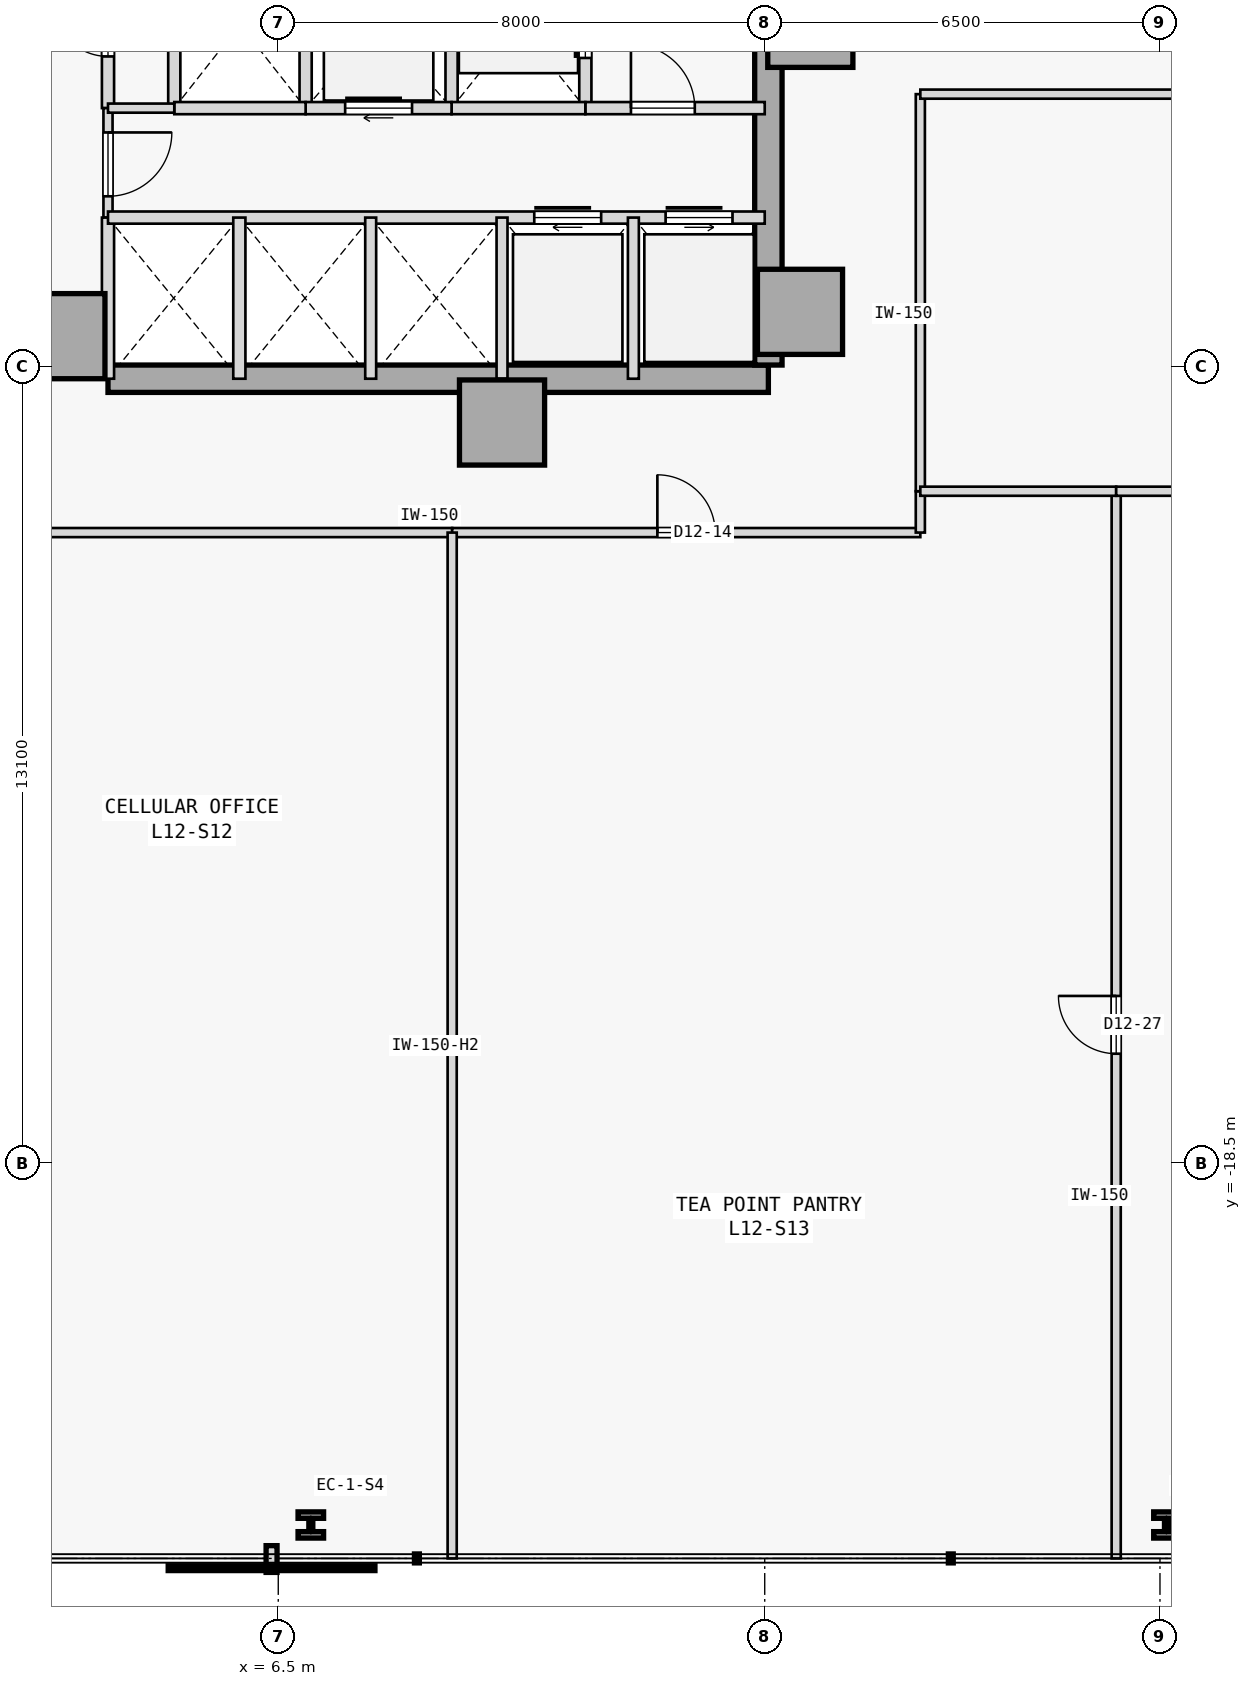
"""IFC4 building model, lengths in metres.
Left out: names, types, materials, properties, quantities, classifications, styles, units other than length and angle.
Written with IfcOpenShell. Run it as: python <this file> out.ifc"""

import sys

from ifc_helpers import new_model, si_unit, direction, frame, frame_2d, origin, origin_2d, place, context, subcontext, project, spatial, rectangle, i_section, extrude, element, fill, save


model = new_model("IFC4")
c1 = context("Model", 3, precision=1e-05, world=origin(), true_north=direction((0.0, 1.0)))
c2 = subcontext(c1, "Body", "Model", "MODEL_VIEW")
j1 = project(units=[si_unit("LENGTHUNIT", "METRE"), si_unit("PLANEANGLEUNIT", "RADIAN")], contexts=[c1])
p1 = place(None, origin())
s1 = spatial("IfcSite", under=j1, at=p1, CompositionType="ELEMENT")
p2 = place(p1, origin())
s2 = spatial("IfcBuilding", under=s1, at=p2, CompositionType="ELEMENT")
p3 = place(p2, frame((0.0, 0.0, 52.2)))
s3 = spatial("IfcBuildingStorey", under=s2, at=p3, CompositionType="ELEMENT", Elevation=52.2)
for number, where, z_axis, x_axis in (
    (1, (15.25, 0.22, 0.0), (0.0, 0.0, 1.0), (1.0, 0.0, 0.0)),
    (2, (15.08, -4.5, 0.0), (0.0, 0.0, 1.0), (1.0, 0.0, 0.0)),
    (3, (10.18, -6.32, 0.0), (0.0, 0.0, 1.0), (1.0, 0.0, 0.0)),
    (4, (2.95, -4.9, 0.0), (0.0, 0.0, 1.0), (1.0, 0.0, 0.0)),
):
    element("IfcColumn", number, at=place(p3, frame(where, z_axis=z_axis, x_axis=x_axis)), inside=s3, PredefinedType="COLUMN", context=c2, shape_type="SweptSolid", body=[
        extrude(rectangle(XDim=1.4, YDim=1.4, at=origin_2d()), origin(), (0.0, 0.0, 1.0), 3.8),
    ])
p4 = place(p3, frame((3.7, -5.6, 0.0), z_axis=(0.0, 0.0, 1.0), x_axis=(1.0, 0.0, 0.0)))
e5 = element("IfcWall", 5, at=p4, inside=s3, PredefinedType="SHEAR", context=c2, shape_type="SweptSolid", body=[
    extrude(rectangle(XDim=10.86, YDim=0.45, at=frame_2d((5.43, 0.0))), origin(), (0.0, 0.0, 1.0), 3.575),
])
p5 = place(p3, frame((14.56, -5.375, 0.0), z_axis=(0.0, 0.0, 1.0), x_axis=(0.0, 1.0, 0.0)))
e6 = element("IfcWall", 6, at=p5, inside=s3, PredefinedType="SHEAR", context=c2, shape_type="SweptSolid", body=[
    extrude(rectangle(XDim=10.75, YDim=0.45, at=frame_2d((5.375, 0.0))), origin(), (0.0, 0.0, 1.0), 3.575),
])
for number, where, z_axis, x_axis in (
    (7, (7.036, -24.45, 0.0), (0.0, 0.0, 1.0), (1.0, 0.0, 0.0)),
    (8, (21.107, -24.45, 0.0), (0.0, 0.0, 1.0), (1.0, 0.0, 0.0)),
):
    element("IfcColumn", number, at=place(p3, frame(where, z_axis=z_axis, x_axis=x_axis)), inside=s3, PredefinedType="COLUMN", context=c2, shape_type="SweptSolid", body=[
        extrude(i_section(OverallWidth=0.42, OverallDepth=0.431, WebThickness=0.065, FlangeThickness=0.106, FilletRadius=0.015, at=origin_2d()), origin(), (0.0, 0.0, 1.0), 3.8),
    ])
p6 = place(p3, frame((3.7, -1.15, 0.0), z_axis=(0.0, 0.0, 1.0), x_axis=(0.0, 1.0, 0.0)))
e9 = element("IfcWall", 9, at=p6, inside=s3, PredefinedType="STANDARD", context=c2, shape_type="SweptSolid", body=[
    extrude(rectangle(XDim=6.75, YDim=0.2, at=frame_2d((3.375, 0.0))), origin(), (0.0, 0.0, 1.0), 3.575),
])
p7 = place(p6, frame((3.6, 0.0, 0.0)))
e10 = element("IfcOpeningElement", 10, at=p7, cuts=e9, PredefinedType="OPENING", context=c2, shape_type="SweptSolid", body=[
    extrude(rectangle(XDim=0.92, YDim=2.15, at=frame_2d((0.46, 1.075))), frame((0.0, 0.11, 0.0), z_axis=(0.0, -1.0, 0.0), x_axis=(1.0, 0.0, 0.0)), (0.0, 0.0, 1.0), 0.22),
])
p8 = place(p6, frame((0.85, 0.0, 0.0)))
e11 = element("IfcOpeningElement", 11, at=p8, cuts=e9, PredefinedType="OPENING", context=c2, shape_type="SweptSolid", body=[
    extrude(rectangle(XDim=0.9, YDim=2.15, at=frame_2d((0.45, 1.075))), frame((0.0, 0.11, 0.0), z_axis=(0.0, -1.0, 0.0), x_axis=(1.0, 0.0, 0.0)), (0.0, 0.0, 1.0), 0.22),
])
p9 = place(p3, frame((3.7, -2.95, 0.0), z_axis=(0.0, 0.0, 1.0), x_axis=(0.0, 1.0, 0.0)))
e12 = element("IfcWall", 12, at=p9, inside=s3, PredefinedType="PARTITIONING", context=c2, shape_type="SweptSolid", body=[
    extrude(rectangle(XDim=1.8, YDim=0.15, at=frame_2d((0.9, 0.0))), origin(), (0.0, 0.0, 1.0), 3.575),
])
p10 = place(p9, frame((0.35, 0.0, 0.0)))
e13 = element("IfcOpeningElement", 13, at=p10, cuts=e12, PredefinedType="OPENING", context=c2, shape_type="SweptSolid", body=[
    extrude(rectangle(XDim=1.05, YDim=2.18, at=frame_2d((0.525, 1.09))), frame((0.0, 0.085, 0.0), z_axis=(0.0, -1.0, 0.0), x_axis=(1.0, 0.0, 0.0)), (0.0, 0.0, 1.0), 0.17),
])
p11 = place(p3, frame((3.7, -5.6, 0.0), z_axis=(0.0, 0.0, 1.0), x_axis=(0.0, 1.0, 0.0)))
e14 = element("IfcWall", 14, at=p11, inside=s3, PredefinedType="STANDARD", context=c2, shape_type="SweptSolid", body=[
    extrude(rectangle(XDim=2.65, YDim=0.2, at=frame_2d((1.325, 0.0))), origin(), (0.0, 0.0, 1.0), 3.575),
])
p12 = place(p3, frame((11.55, -1.15, 0.0), z_axis=(0.0, 0.0, 1.0), x_axis=(0.0, 1.0, 0.0)))
e15 = element("IfcWall", 15, at=p12, inside=s3, PredefinedType="STANDARD", context=c2, shape_type="SweptSolid", body=[
    extrude(rectangle(XDim=2.75, YDim=0.2, at=frame_2d((1.375, 0.0))), origin(), (0.0, 0.0, 1.0), 3.575),
])
p13 = place(p12, frame((0.825, 0.0, 0.0)))
e16 = element("IfcOpeningElement", 16, at=p13, cuts=e15, PredefinedType="OPENING", context=c2, shape_type="SweptSolid", body=[
    extrude(rectangle(XDim=1.1, YDim=2.15, at=frame_2d((0.55, 1.075))), frame((0.0, 0.11, 0.0), z_axis=(0.0, -1.0, 0.0), x_axis=(1.0, 0.0, 0.0)), (0.0, 0.0, 1.0), 0.22),
])
p14 = place(p3, frame((9.35, -1.15, 0.0), z_axis=(0.0, 0.0, 1.0), x_axis=(0.0, 1.0, 0.0)))
e17 = element("IfcWall", 17, at=p14, inside=s3, PredefinedType="STANDARD", context=c2, shape_type="SweptSolid", body=[
    extrude(rectangle(XDim=2.75, YDim=0.2, at=frame_2d((1.375, 0.0))), origin(), (0.0, 0.0, 1.0), 3.575),
])
p15 = place(p3, frame((11.55, -1.15, 0.0), z_axis=(0.0, 0.0, 1.0), x_axis=(1.0, 0.0, 0.0)))
e18 = element("IfcWall", 18, at=p15, inside=s3, PredefinedType="STANDARD", context=c2, shape_type="SweptSolid", body=[
    extrude(rectangle(XDim=2.95, YDim=0.2, at=frame_2d((1.475, 0.0))), origin(), (0.0, 0.0, 1.0), 3.575),
])
p16 = place(p15, frame((0.75, 0.0, 0.0)))
e19 = element("IfcOpeningElement", 19, at=p16, cuts=e18, PredefinedType="OPENING", context=c2, shape_type="SweptSolid", body=[
    extrude(rectangle(XDim=1.05, YDim=2.18, at=frame_2d((0.525, 1.09))), frame((0.0, 0.11, 0.0), z_axis=(0.0, -1.0, 0.0), x_axis=(1.0, 0.0, 0.0)), (0.0, 0.0, 1.0), 0.22),
])
p17 = place(p3, frame((9.35, -1.15, 0.0), z_axis=(0.0, 0.0, 1.0), x_axis=(1.0, 0.0, 0.0)))
e20 = element("IfcWall", 20, at=p17, inside=s3, PredefinedType="STANDARD", context=c2, shape_type="SweptSolid", body=[
    extrude(rectangle(XDim=2.2, YDim=0.2, at=frame_2d((1.1, 0.0))), origin(), (0.0, 0.0, 1.0), 3.575),
])
p18 = place(p3, frame((6.95, -1.15, 0.0), z_axis=(0.0, 0.0, 1.0), x_axis=(0.0, 1.0, 0.0)))
e21 = element("IfcWall", 21, at=p18, inside=s3, PredefinedType="STANDARD", context=c2, shape_type="SweptSolid", body=[
    extrude(rectangle(XDim=2.75, YDim=0.2, at=frame_2d((1.375, 0.0))), origin(), (0.0, 0.0, 1.0), 3.575),
])
p19 = place(p3, frame((6.95, -1.15, 0.0), z_axis=(0.0, 0.0, 1.0), x_axis=(1.0, 0.0, 0.0)))
e22 = element("IfcWall", 22, at=p19, inside=s3, PredefinedType="STANDARD", context=c2, shape_type="SweptSolid", body=[
    extrude(rectangle(XDim=2.4, YDim=0.2, at=frame_2d((1.2, 0.0))), origin(), (0.0, 0.0, 1.0), 3.575),
])
p20 = place(p19, frame((0.65, 0.0, 0.0)))
e23 = element("IfcOpeningElement", 23, at=p20, cuts=e22, PredefinedType="OPENING", context=c2, shape_type="SweptSolid", body=[
    extrude(rectangle(XDim=1.1, YDim=2.15, at=frame_2d((0.55, 1.075))), frame((0.0, 0.11, 0.0), z_axis=(0.0, -1.0, 0.0), x_axis=(1.0, 0.0, 0.0)), (0.0, 0.0, 1.0), 0.22),
])
p21 = place(p3, frame((4.79, -1.15, 0.0), z_axis=(0.0, 0.0, 1.0), x_axis=(0.0, 1.0, 0.0)))
e24 = element("IfcWall", 24, at=p21, inside=s3, PredefinedType="STANDARD", context=c2, shape_type="SweptSolid", body=[
    extrude(rectangle(XDim=2.75, YDim=0.2, at=frame_2d((1.375, 0.0))), origin(), (0.0, 0.0, 1.0), 3.575),
])
p22 = place(p3, frame((4.79, -1.15, 0.0), z_axis=(0.0, 0.0, 1.0), x_axis=(1.0, 0.0, 0.0)))
e25 = element("IfcWall", 25, at=p22, inside=s3, PredefinedType="STANDARD", context=c2, shape_type="SweptSolid", body=[
    extrude(rectangle(XDim=2.16, YDim=0.2, at=frame_2d((1.08, 0.0))), origin(), (0.0, 0.0, 1.0), 3.575),
])
p23 = place(p3, frame((3.7, -1.15, 0.0), z_axis=(0.0, 0.0, 1.0), x_axis=(1.0, 0.0, 0.0)))
e26 = element("IfcWall", 26, at=p23, inside=s3, PredefinedType="PARTITIONING", context=c2, shape_type="SweptSolid", body=[
    extrude(rectangle(XDim=1.09, YDim=0.15, at=frame_2d((0.545, 0.0))), origin(), (0.0, 0.0, 1.0), 3.575),
])
p24 = place(p3, frame((3.7, -2.95, 0.0), z_axis=(0.0, 0.0, 1.0), x_axis=(1.0, 0.0, 0.0)))
e27 = element("IfcWall", 27, at=p24, inside=s3, PredefinedType="STANDARD", context=c2, shape_type="SweptSolid", body=[
    extrude(rectangle(XDim=10.8, YDim=0.2, at=frame_2d((5.4, 0.0))), origin(), (0.0, 0.0, 1.0), 3.575),
])
p25 = place(p24, frame((7.01, 0.0, 0.0)))
e28 = element("IfcOpeningElement", 28, at=p25, cuts=e27, PredefinedType="OPENING", context=c2, shape_type="SweptSolid", body=[
    extrude(rectangle(XDim=1.1, YDim=2.15, at=frame_2d((0.55, 1.075))), frame((0.0, 0.11, 0.0), z_axis=(0.0, -1.0, 0.0), x_axis=(1.0, 0.0, 0.0)), (0.0, 0.0, 1.0), 0.22),
])
p26 = place(p24, frame((9.17, 0.0, 0.0)))
e29 = element("IfcOpeningElement", 29, at=p26, cuts=e27, PredefinedType="OPENING", context=c2, shape_type="SweptSolid", body=[
    extrude(rectangle(XDim=1.1, YDim=2.15, at=frame_2d((0.55, 1.075))), frame((0.0, 0.11, 0.0), z_axis=(0.0, -1.0, 0.0), x_axis=(1.0, 0.0, 0.0)), (0.0, 0.0, 1.0), 0.22),
])
p27 = place(p3, frame((5.86, -5.6, 0.0), z_axis=(0.0, 0.0, 1.0), x_axis=(0.0, 1.0, 0.0)))
e30 = element("IfcWall", 30, at=p27, inside=s3, PredefinedType="STANDARD", context=c2, shape_type="SweptSolid", body=[
    extrude(rectangle(XDim=2.65, YDim=0.2, at=frame_2d((1.325, 0.0))), origin(), (0.0, 0.0, 1.0), 3.575),
])
for number, where, z_axis, x_axis in (
    (31, (12.34, -5.6, 0.0), (0.0, 0.0, 1.0), (0.0, 1.0, 0.0)),
    (32, (10.18, -5.6, 0.0), (0.0, 0.0, 1.0), (0.0, 1.0, 0.0)),
    (33, (8.02, -5.6, 0.0), (0.0, 0.0, 1.0), (0.0, 1.0, 0.0)),
):
    element("IfcWall", number, at=place(p3, frame(where, z_axis=z_axis, x_axis=x_axis)), inside=s3, PredefinedType="STANDARD", context=c2, shape_type="SweptSolid", body=[
        extrude(rectangle(XDim=2.65, YDim=0.18, at=frame_2d((1.325, 0.0))), origin(), (0.0, 0.0, 1.0), 3.575),
    ])
p28 = place(p3, frame((0.92, -8.13, 0.0), z_axis=(0.0, 0.0, 1.0), x_axis=(1.0, 0.0, 0.0)))
e34 = element("IfcWall", 34, at=p28, inside=s3, PredefinedType="PARTITIONING", context=c2, shape_type="SweptSolid", body=[
    extrude(rectangle(XDim=8.44, YDim=0.15, at=frame_2d((4.22, 0.0))), origin(), (0.0, 0.0, 1.0), 3.575),
])
p29 = place(p3, frame((9.36, -8.13, 0.0), z_axis=(0.0, 0.0, 1.0), x_axis=(1.0, 0.0, 0.0)))
e35 = element("IfcWall", 35, at=p29, inside=s3, PredefinedType="PARTITIONING", context=c2, shape_type="SweptSolid", body=[
    extrude(rectangle(XDim=7.699, YDim=0.15, at=frame_2d((3.85, 0.0))), origin(), (0.0, 0.0, 1.0), 3.575),
])
p30 = place(p29, frame((3.375, 0.0, 0.0)))
e36 = element("IfcOpeningElement", 36, at=p30, cuts=e35, PredefinedType="OPENING", context=c2, shape_type="SweptSolid", body=[
    extrude(rectangle(XDim=0.95, YDim=2.15, at=frame_2d((0.475, 1.075))), frame((0.0, 0.085, 0.0), z_axis=(0.0, -1.0, 0.0), x_axis=(1.0, 0.0, 0.0)), (0.0, 0.0, 1.0), 0.17),
])
p31 = place(p3, frame((17.059, -8.13, 0.0), z_axis=(0.0, 0.0, 1.0), x_axis=(0.0, 1.0, 0.0)))
e37 = element("IfcWall", 37, at=p31, inside=s3, PredefinedType="PARTITIONING", context=c2, shape_type="SweptSolid", body=[
    extrude(rectangle(XDim=0.68, YDim=0.15, at=frame_2d((0.34, 0.0))), origin(), (0.0, 0.0, 1.0), 3.575),
])
p32 = place(p3, frame((17.059, -7.45, 0.0), z_axis=(0.0, 0.0, 1.0), x_axis=(0.0, 1.0, 0.0)))
e38 = element("IfcWall", 38, at=p32, inside=s3, PredefinedType="PARTITIONING", context=c2, shape_type="SweptSolid", body=[
    extrude(rectangle(XDim=6.53, YDim=0.15, at=frame_2d((3.265, 0.0))), origin(), (0.0, 0.0, 1.0), 3.575),
])
p33 = place(p3, frame((17.059, -0.92, 0.0), z_axis=(0.0, 0.0, 1.0), x_axis=(1.0, 0.0, 0.0)))
e39 = element("IfcWall", 39, at=p33, inside=s3, PredefinedType="PARTITIONING", context=c2, shape_type="SweptSolid", body=[
    extrude(rectangle(XDim=21.941, YDim=0.15, at=frame_2d((10.97, 0.0))), origin(), (0.0, 0.0, 1.0), 3.575),
])
p34 = place(p33, frame((10.496, 0.0, 0.0)))
e40 = element("IfcOpeningElement", 40, at=p34, cuts=e39, PredefinedType="OPENING", context=c2, shape_type="SweptSolid", body=[
    extrude(rectangle(XDim=0.95, YDim=2.15, at=frame_2d((0.475, 1.075))), frame((0.0, 0.085, 0.0), z_axis=(0.0, -1.0, 0.0), x_axis=(1.0, 0.0, 0.0)), (0.0, 0.0, 1.0), 0.17),
])
p35 = place(p3, frame((9.36, -25.0, 0.0), z_axis=(0.0, 0.0, 1.0), x_axis=(0.0, 1.0, 0.0)))
e41 = element("IfcWall", 41, at=p35, inside=s3, PredefinedType="PARTITIONING", context=c2, shape_type="SweptSolid", body=[
    extrude(rectangle(XDim=16.87, YDim=0.15, at=frame_2d((8.435, 0.0))), origin(), (0.0, 0.0, 1.0), 2.975),
])
p36 = place(p3, frame((20.28, -25.0, 0.0), z_axis=(0.0, 0.0, 1.0), x_axis=(0.0, 1.0, 0.0)))
e42 = element("IfcWall", 42, at=p36, inside=s3, PredefinedType="PARTITIONING", context=c2, shape_type="SweptSolid", body=[
    extrude(rectangle(XDim=17.55, YDim=0.15, at=frame_2d((8.775, 0.0))), origin(), (0.0, 0.0, 1.0), 3.575),
])
p37 = place(p36, frame((8.3, 0.0, 0.0)))
e43 = element("IfcOpeningElement", 43, at=p37, cuts=e42, PredefinedType="OPENING", context=c2, shape_type="SweptSolid", body=[
    extrude(rectangle(XDim=0.95, YDim=2.15, at=frame_2d((0.475, 1.075))), frame((0.0, 0.085, 0.0), z_axis=(0.0, -1.0, 0.0), x_axis=(1.0, 0.0, 0.0)), (0.0, 0.0, 1.0), 0.17),
])
p38 = place(p3, frame((17.059, -7.45, 0.0), z_axis=(0.0, 0.0, 1.0), x_axis=(1.0, 0.0, 0.0)))
e44 = element("IfcWall", 44, at=p38, inside=s3, PredefinedType="PARTITIONING", context=c2, shape_type="SweptSolid", body=[
    extrude(rectangle(XDim=3.221, YDim=0.15, at=frame_2d((1.61, 0.0))), origin(), (0.0, 0.0, 1.0), 3.575),
])
p39 = place(p3, frame((20.28, -7.45, 0.0), z_axis=(0.0, 0.0, 1.0), x_axis=(1.0, 0.0, 0.0)))
e45 = element("IfcWall", 45, at=p39, inside=s3, PredefinedType="PARTITIONING", context=c2, shape_type="SweptSolid", body=[
    extrude(rectangle(XDim=10.14, YDim=0.15, at=frame_2d((5.07, 0.0))), origin(), (0.0, 0.0, 1.0), 3.575),
])
p40 = place(p16, origin())
e46 = element("IfcDoor", 46, at=p40, inside=s3, OperationType="SINGLE_SWING_LEFT", PredefinedType="DOOR", context=c2, shape_type="SweptSolid", body=[
    extrude(rectangle(XDim=1.05, YDim=2.18, at=frame_2d((0.525, 1.09))), frame((0.0, 0.025, 0.0), z_axis=(0.0, -1.0, 0.0), x_axis=(1.0, 0.0, 0.0)), (0.0, 0.0, 1.0), 0.05),
])
fill(e19, e46)
p41 = place(p10, frame((1.05, 0.0, 0.0), z_axis=(0.0, 0.0, 1.0), x_axis=(-1.0, 0.0, 0.0)))
e47 = element("IfcDoor", 47, at=p41, inside=s3, OperationType="SINGLE_SWING_RIGHT", PredefinedType="DOOR", context=c2, shape_type="SweptSolid", body=[
    extrude(rectangle(XDim=1.05, YDim=2.18, at=frame_2d((0.525, 1.09))), frame((0.0, 0.025, 0.0), z_axis=(0.0, -1.0, 0.0), x_axis=(1.0, 0.0, 0.0)), (0.0, 0.0, 1.0), 0.05),
])
fill(e13, e47)
p42 = place(p13, origin())
e48 = element("IfcDoor", 48, at=p42, inside=s3, OperationType="SLIDING_TO_RIGHT", PredefinedType="DOOR", context=c2, shape_type="SweptSolid", body=[
    extrude(rectangle(XDim=1.1, YDim=2.15, at=frame_2d((0.55, 1.075))), frame((0.0, 0.025, 0.0), z_axis=(0.0, -1.0, 0.0), x_axis=(1.0, 0.0, 0.0)), (0.0, 0.0, 1.0), 0.05),
])
fill(e16, e48)
p43 = place(p20, origin())
e49 = element("IfcDoor", 49, at=p43, inside=s3, OperationType="SLIDING_TO_RIGHT", PredefinedType="DOOR", context=c2, shape_type="SweptSolid", body=[
    extrude(rectangle(XDim=1.1, YDim=2.15, at=frame_2d((0.55, 1.075))), frame((0.0, 0.025, 0.0), z_axis=(0.0, -1.0, 0.0), x_axis=(1.0, 0.0, 0.0)), (0.0, 0.0, 1.0), 0.05),
])
fill(e23, e49)
p44 = place(p25, origin())
e50 = element("IfcDoor", 50, at=p44, inside=s3, OperationType="SLIDING_TO_RIGHT", PredefinedType="DOOR", context=c2, shape_type="SweptSolid", body=[
    extrude(rectangle(XDim=1.1, YDim=2.15, at=frame_2d((0.55, 1.075))), frame((0.0, 0.025, 0.0), z_axis=(0.0, -1.0, 0.0), x_axis=(1.0, 0.0, 0.0)), (0.0, 0.0, 1.0), 0.05),
])
fill(e28, e50)
p45 = place(p26, origin())
e51 = element("IfcDoor", 51, at=p45, inside=s3, OperationType="SLIDING_TO_LEFT", PredefinedType="DOOR", context=c2, shape_type="SweptSolid", body=[
    extrude(rectangle(XDim=1.1, YDim=2.15, at=frame_2d((0.55, 1.075))), frame((0.0, 0.025, 0.0), z_axis=(0.0, -1.0, 0.0), x_axis=(1.0, 0.0, 0.0)), (0.0, 0.0, 1.0), 0.05),
])
fill(e29, e51)
p46 = place(p8, origin())
e52 = element("IfcDoor", 52, at=p46, inside=s3, OperationType="SINGLE_SWING_RIGHT", PredefinedType="DOOR", context=c2, shape_type="SweptSolid", body=[
    extrude(rectangle(XDim=0.9, YDim=2.15, at=frame_2d((0.45, 1.075))), frame((0.0, 0.025, 0.0), z_axis=(0.0, -1.0, 0.0), x_axis=(1.0, 0.0, 0.0)), (0.0, 0.0, 1.0), 0.05),
])
fill(e11, e52)
p47 = place(p30, origin())
e53 = element("IfcDoor", 53, at=p47, inside=s3, OperationType="SINGLE_SWING_LEFT", PredefinedType="DOOR", context=c2, shape_type="SweptSolid", body=[
    extrude(rectangle(XDim=0.95, YDim=2.15, at=frame_2d((0.475, 1.075))), frame((0.0, 0.025, 0.0), z_axis=(0.0, -1.0, 0.0), x_axis=(1.0, 0.0, 0.0)), (0.0, 0.0, 1.0), 0.05),
])
fill(e36, e53)
p48 = place(p37, origin())
e54 = element("IfcDoor", 54, at=p48, inside=s3, OperationType="SINGLE_SWING_RIGHT", PredefinedType="DOOR", context=c2, shape_type="SweptSolid", body=[
    extrude(rectangle(XDim=0.95, YDim=2.15, at=frame_2d((0.475, 1.075))), frame((0.0, 0.025, 0.0), z_axis=(0.0, -1.0, 0.0), x_axis=(1.0, 0.0, 0.0)), (0.0, 0.0, 1.0), 0.05),
])
fill(e43, e54)
save(model, sys.argv[1])
